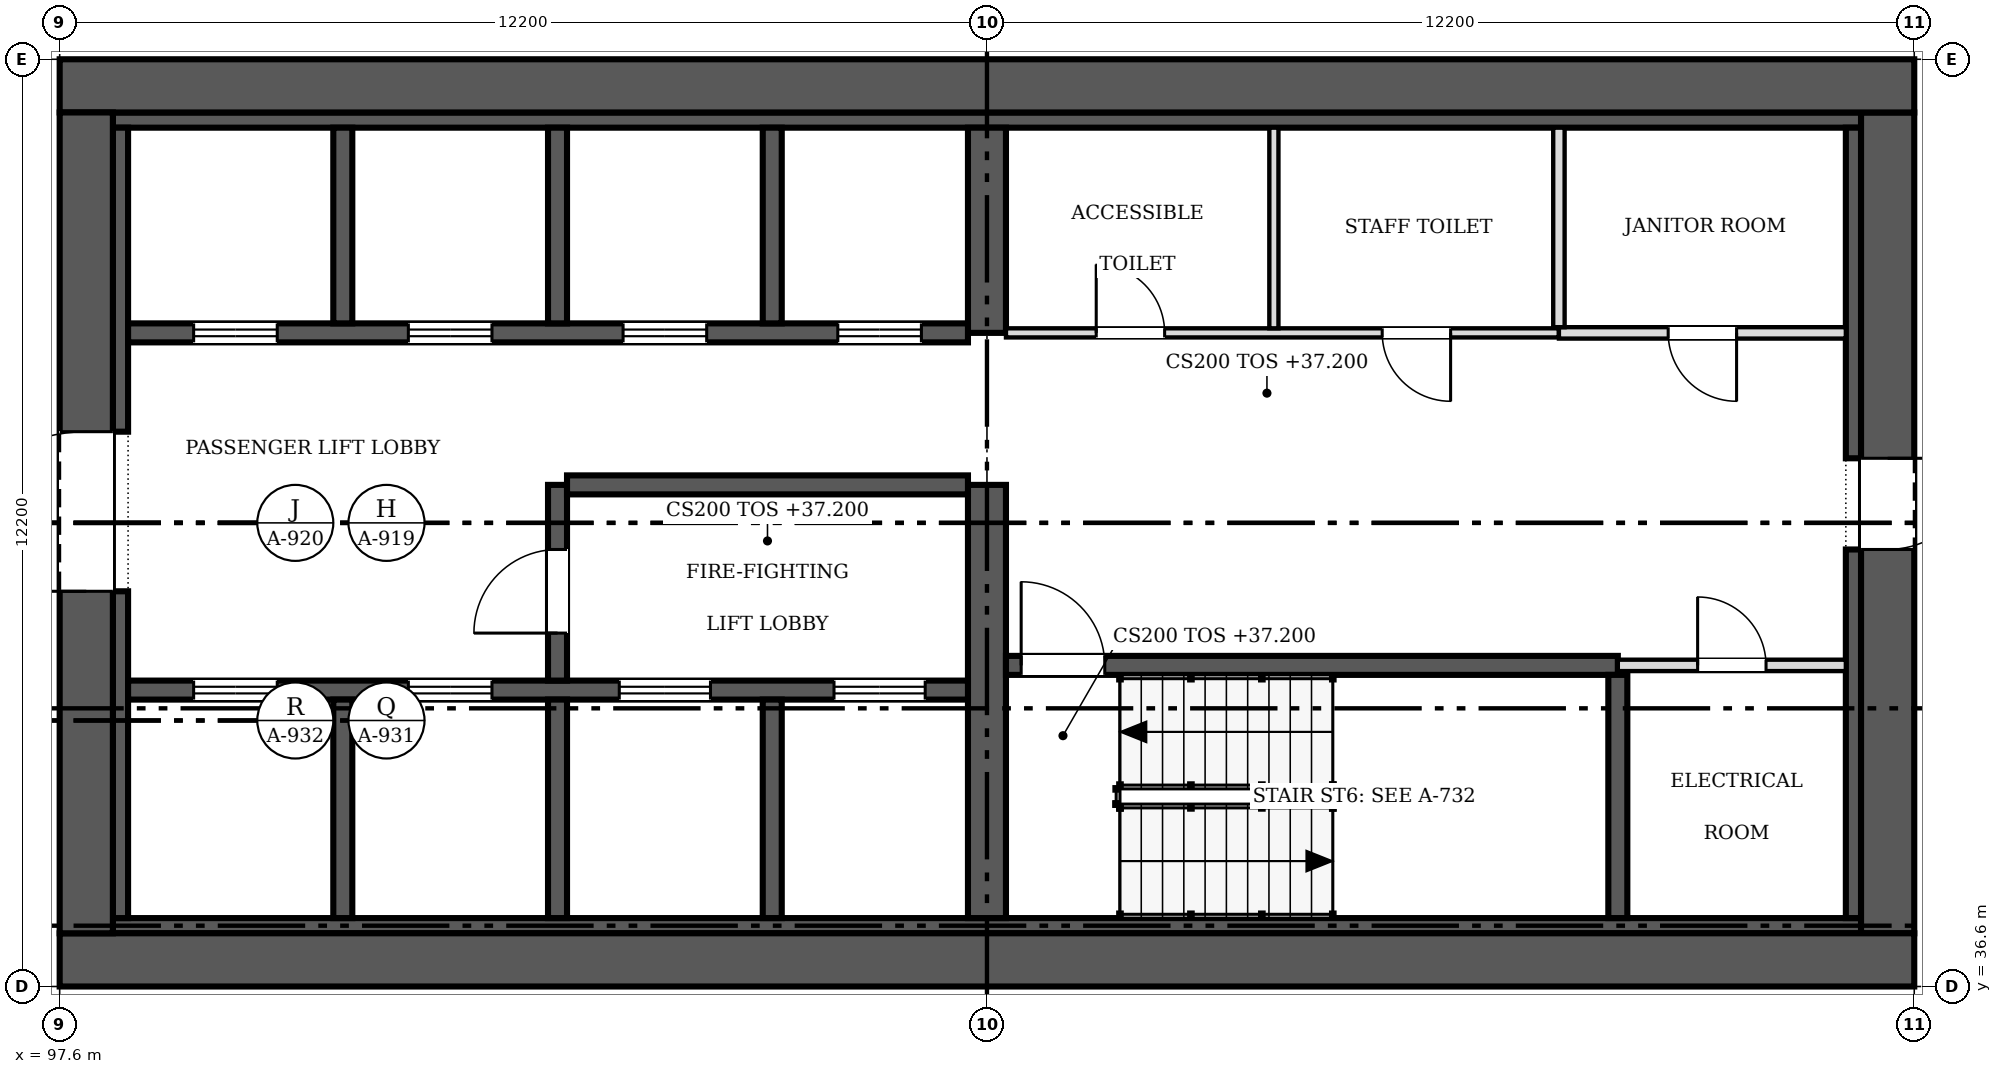
"""IFC4 building model, lengths in metres.
Left out: names, types, materials, properties, quantities, classifications, styles, units other than length and angle.
Written with IfcOpenShell. Run it as: python <this file> out.ifc"""

import sys

from ifc_helpers import new_model, si_unit, direction, frame, frame_2d, origin, place, context, subcontext, project, spatial, rectangle, extrude, source, transform, mapped, element, fill, save


model = new_model("IFC4")
c1 = context("Model", 3, precision=1e-05, world=origin(), true_north=direction((0.0, 1.0)))
c2 = subcontext(c1, "Body", "Model", "MODEL_VIEW")
j1 = project(units=[si_unit("LENGTHUNIT", "METRE"), si_unit("PLANEANGLEUNIT", "RADIAN")], contexts=[c1])
p1 = place(None, origin())
s1 = spatial("IfcSite", under=j1, at=p1, CompositionType="ELEMENT")
p2 = place(p1, origin())
s2 = spatial("IfcBuilding", under=s1, at=p2, CompositionType="ELEMENT")
p3 = place(p2, frame((0.0, 0.0, 37.2)))
s3 = spatial("IfcBuildingStorey", under=s2, at=p3, CompositionType="ELEMENT", Elevation=37.2)
p4 = place(p3, frame((122.0, 36.95, 0.0), z_axis=(0.0, 0.0, 1.0), x_axis=(-1.0, 0.0, 0.0)))
e1 = element("IfcWall", 1, at=p4, inside=s3, PredefinedType="SHEAR", context=c2, shape_type="SweptSolid", body=[
    extrude(rectangle(XDim=24.4, YDim=0.7, at=frame_2d((12.2, 0.0))), origin(), (0.0, 0.0, 1.0), 3.8),
])
p5 = place(p3, frame((97.95, 37.3, 0.0), z_axis=(0.0, 0.0, 1.0), x_axis=(0.0, 1.0, 0.0)))
e2 = element("IfcWall", 2, at=p5, inside=s3, PredefinedType="SHEAR", context=c2, shape_type="SweptSolid", body=[
    extrude(rectangle(XDim=10.8, YDim=0.7, at=frame_2d((5.4, 0.0))), origin(), (0.0, 0.0, 1.0), 3.8),
])
m1 = source(origin(), c2, "Body", "SweptSolid", [
    extrude(rectangle(XDim=2.1, YDim=2.4, at=frame_2d((1.05, 1.2))), frame((0.0, 0.36, 0.0), z_axis=(0.0, -1.0, 0.0), x_axis=(1.0, 0.0, 0.0)), (0.0, 0.0, 1.0), 0.72),
])
p6 = place(p5, frame((4.5, 0.0, 0.0)))
e3 = element("IfcOpeningElement", 3, at=p6, cuts=e2, PredefinedType="OPENING", context=c2, shape_type="MappedRepresentation", body=[
    mapped(m1, transform((0.0, 0.0, 0.0), scale=1.0)),
])
p7 = place(p3, frame((97.6, 48.45, 0.0), z_axis=(0.0, 0.0, 1.0), x_axis=(1.0, 0.0, 0.0)))
e4 = element("IfcWall", 4, at=p7, inside=s3, PredefinedType="SHEAR", context=c2, shape_type="SweptSolid", body=[
    extrude(rectangle(XDim=24.4, YDim=0.7, at=frame_2d((12.2, 0.0))), origin(), (0.0, 0.0, 1.0), 3.8),
])
p8 = place(p3, frame((121.65, 48.1, 0.0), z_axis=(0.0, 0.0, 1.0), x_axis=(0.0, -1.0, 0.0)))
e5 = element("IfcWall", 5, at=p8, inside=s3, PredefinedType="SHEAR", context=c2, shape_type="SweptSolid", body=[
    extrude(rectangle(XDim=10.8, YDim=0.7, at=frame_2d((5.4, 0.0))), origin(), (0.0, 0.0, 1.0), 3.8),
])
m2 = source(origin(), c2, "Body", "SweptSolid", [
    extrude(rectangle(XDim=1.2, YDim=2.1, at=frame_2d((0.6, 1.05))), frame((0.0, 0.36, 0.0), z_axis=(0.0, -1.0, 0.0), x_axis=(1.0, 0.0, 0.0)), (0.0, 0.0, 1.0), 0.72),
])
p9 = place(p8, frame((4.55, 0.0, 0.0)))
e6 = element("IfcOpeningElement", 6, at=p9, cuts=e5, PredefinedType="OPENING", context=c2, shape_type="MappedRepresentation", body=[
    mapped(m2, transform((0.0, 0.0, 0.0), scale=1.0)),
])
for number, where, z_axis, x_axis in (
    (7, (98.3, 37.4, 0.0), (0.0, 0.0, 1.0), (1.0, 0.0, 0.0)),
    (8, (98.3, 48.0, 0.0), (0.0, 0.0, 1.0), (1.0, 0.0, 0.0)),
):
    element("IfcWall", number, at=place(p3, frame(where, z_axis=z_axis, x_axis=x_axis)), inside=s3, PredefinedType="SOLIDWALL", context=c2, shape_type="SweptSolid", body=[
        extrude(rectangle(XDim=23.0, YDim=0.2, at=frame_2d((11.5, 0.0))), origin(), (0.0, 0.0, 1.0), 3.8),
    ])
p10 = place(p3, frame((98.4, 37.5, 0.0), z_axis=(0.0, 0.0, 1.0), x_axis=(0.0, 1.0, 0.0)))
e9 = element("IfcWall", 9, at=p10, inside=s3, PredefinedType="SOLIDWALL", context=c2, shape_type="SweptSolid", body=[
    extrude(rectangle(XDim=4.3, YDim=0.2, at=frame_2d((2.15, 0.0))), origin(), (0.0, 0.0, 1.0), 3.8),
])
p11 = place(p3, frame((98.4, 43.9, 0.0), z_axis=(0.0, 0.0, 1.0), x_axis=(0.0, 1.0, 0.0)))
e10 = element("IfcWall", 10, at=p11, inside=s3, PredefinedType="SOLIDWALL", context=c2, shape_type="SweptSolid", body=[
    extrude(rectangle(XDim=4.0, YDim=0.2, at=frame_2d((2.0, 0.0))), origin(), (0.0, 0.0, 1.0), 3.8),
])
p12 = place(p3, frame((121.2, 37.5, 0.0), z_axis=(0.0, 0.0, 1.0), x_axis=(0.0, 1.0, 0.0)))
e11 = element("IfcWall", 11, at=p12, inside=s3, PredefinedType="SOLIDWALL", context=c2, shape_type="SweptSolid", body=[
    extrude(rectangle(XDim=4.85, YDim=0.2, at=frame_2d((2.425, 0.0))), origin(), (0.0, 0.0, 1.0), 3.8),
])
p13 = place(p3, frame((121.2, 43.55, 0.0), z_axis=(0.0, 0.0, 1.0), x_axis=(0.0, 1.0, 0.0)))
e12 = element("IfcWall", 12, at=p13, inside=s3, PredefinedType="SOLIDWALL", context=c2, shape_type="SweptSolid", body=[
    extrude(rectangle(XDim=4.35, YDim=0.2, at=frame_2d((2.175, 0.0))), origin(), (0.0, 0.0, 1.0), 3.8),
])
p14 = place(p3, frame((109.8, 37.5, 0.0), z_axis=(0.0, 0.0, 1.0), x_axis=(0.0, 1.0, 0.0)))
e13 = element("IfcWall", 13, at=p14, inside=s3, PredefinedType="SHEAR", context=c2, shape_type="SweptSolid", body=[
    extrude(rectangle(XDim=5.7, YDim=0.5, at=frame_2d((2.85, 0.0))), origin(), (0.0, 0.0, 1.0), 3.8),
])
p15 = place(p3, frame((109.8, 45.2, 0.0), z_axis=(0.0, 0.0, 1.0), x_axis=(0.0, 1.0, 0.0)))
e14 = element("IfcWall", 14, at=p15, inside=s3, PredefinedType="SHEAR", context=c2, shape_type="SweptSolid", body=[
    extrude(rectangle(XDim=2.7, YDim=0.5, at=frame_2d((1.35, 0.0))), origin(), (0.0, 0.0, 1.0), 3.8),
])
p16 = place(p3, frame((98.5, 40.5, 0.0), z_axis=(0.0, 0.0, 1.0), x_axis=(1.0, 0.0, 0.0)))
e15 = element("IfcWall", 15, at=p16, inside=s3, PredefinedType="SOLIDWALL", context=c2, shape_type="SweptSolid", body=[
    extrude(rectangle(XDim=11.05, YDim=0.25, at=frame_2d((5.525, 0.0))), origin(), (0.0, 0.0, 1.0), 3.8),
])
m3 = source(origin(), c2, "Body", "SweptSolid", [
    extrude(rectangle(XDim=1.1, YDim=2.1, at=frame_2d((0.55, 1.05))), frame((0.0, 0.135, 0.0), z_axis=(0.0, -1.0, 0.0), x_axis=(1.0, 0.0, 0.0)), (0.0, 0.0, 1.0), 0.27),
])
p17 = place(p16, frame((0.863, 0.0, 0.0)))
e16 = element("IfcOpeningElement", 16, at=p17, cuts=e15, PredefinedType="OPENING", context=c2, shape_type="MappedRepresentation", body=[
    mapped(m3, transform((0.0, 0.0, 0.0), scale=1.0)),
])
p18 = place(p16, frame((3.688, 0.0, 0.0)))
e17 = element("IfcOpeningElement", 17, at=p18, cuts=e15, PredefinedType="OPENING", context=c2, shape_type="MappedRepresentation", body=[
    mapped(m3, transform((0.0, 0.0, 0.0), scale=1.0)),
])
m4 = source(origin(), c2, "Body", "SweptSolid", [
    extrude(rectangle(XDim=1.2, YDim=2.1, at=frame_2d((0.6, 1.05))), frame((0.0, 0.135, 0.0), z_axis=(0.0, -1.0, 0.0), x_axis=(1.0, 0.0, 0.0)), (0.0, 0.0, 1.0), 0.27),
])
p19 = place(p16, frame((6.462, 0.0, 0.0)))
e18 = element("IfcOpeningElement", 18, at=p19, cuts=e15, PredefinedType="OPENING", context=c2, shape_type="MappedRepresentation", body=[
    mapped(m4, transform((0.0, 0.0, 0.0), scale=1.0)),
])
p20 = place(p16, frame((9.288, 0.0, 0.0)))
e19 = element("IfcOpeningElement", 19, at=p20, cuts=e15, PredefinedType="OPENING", context=c2, shape_type="MappedRepresentation", body=[
    mapped(m4, transform((0.0, 0.0, 0.0), scale=1.0)),
])
p21 = place(p3, frame((109.55, 45.2, 0.0), z_axis=(0.0, 0.0, 1.0), x_axis=(-1.0, 0.0, 0.0)))
e20 = element("IfcWall", 20, at=p21, inside=s3, PredefinedType="SOLIDWALL", context=c2, shape_type="SweptSolid", body=[
    extrude(rectangle(XDim=11.05, YDim=0.25, at=frame_2d((5.525, 0.0))), origin(), (0.0, 0.0, 1.0), 3.8),
])
p22 = place(p21, frame((9.087, 0.0, 0.0)))
e21 = element("IfcOpeningElement", 21, at=p22, cuts=e20, PredefinedType="OPENING", context=c2, shape_type="MappedRepresentation", body=[
    mapped(m3, transform((0.0, 0.0, 0.0), scale=1.0)),
])
p23 = place(p21, frame((6.262, 0.0, 0.0)))
e22 = element("IfcOpeningElement", 22, at=p23, cuts=e20, PredefinedType="OPENING", context=c2, shape_type="MappedRepresentation", body=[
    mapped(m3, transform((0.0, 0.0, 0.0), scale=1.0)),
])
p24 = place(p21, frame((3.438, 0.0, 0.0)))
e23 = element("IfcOpeningElement", 23, at=p24, cuts=e20, PredefinedType="OPENING", context=c2, shape_type="MappedRepresentation", body=[
    mapped(m3, transform((0.0, 0.0, 0.0), scale=1.0)),
])
p25 = place(p21, frame((0.613, 0.0, 0.0)))
e24 = element("IfcOpeningElement", 24, at=p25, cuts=e20, PredefinedType="OPENING", context=c2, shape_type="MappedRepresentation", body=[
    mapped(m3, transform((0.0, 0.0, 0.0), scale=1.0)),
])
p26 = place(p3, frame((118.1, 40.825, 0.0), z_axis=(0.0, 0.0, 1.0), x_axis=(-1.0, 0.0, 0.0)))
e25 = element("IfcWall", 25, at=p26, inside=s3, PredefinedType="SOLIDWALL", context=c2, shape_type="SweptSolid", body=[
    extrude(rectangle(XDim=8.05, YDim=0.25, at=frame_2d((4.025, 0.0))), origin(), (0.0, 0.0, 1.0), 3.8),
])
p27 = place(p26, frame((6.75, 0.0, 0.0)))
e26 = element("IfcOpeningElement", 26, at=p27, cuts=e25, PredefinedType="OPENING", context=c2, shape_type="MappedRepresentation", body=[
    mapped(m3, transform((0.0, 0.0, 0.0), scale=1.0)),
])
p28 = place(p3, frame((104.15, 37.5, 0.0), z_axis=(0.0, 0.0, 1.0), x_axis=(0.0, 1.0, 0.0)))
e27 = element("IfcWall", 27, at=p28, inside=s3, PredefinedType="SOLIDWALL", context=c2, shape_type="SweptSolid", body=[
    extrude(rectangle(XDim=2.875, YDim=0.25, at=frame_2d((1.438, 0.0))), origin(), (0.0, 0.0, 1.0), 3.8),
])
p29 = place(p3, frame((104.15, 43.2, 0.0), z_axis=(0.0, 0.0, 1.0), x_axis=(0.0, -1.0, 0.0)))
e28 = element("IfcWall", 28, at=p29, inside=s3, PredefinedType="SOLIDWALL", context=c2, shape_type="SweptSolid", body=[
    extrude(rectangle(XDim=2.575, YDim=0.25, at=frame_2d((1.288, 0.0))), origin(), (0.0, 0.0, 1.0), 3.8),
])
p30 = place(p29, frame((0.85, 0.0, 0.0)))
e29 = element("IfcOpeningElement", 29, at=p30, cuts=e28, PredefinedType="OPENING", context=c2, shape_type="MappedRepresentation", body=[
    mapped(m3, transform((0.0, 0.0, 0.0), scale=1.0)),
])
p31 = place(p3, frame((104.275, 43.2, 0.0), z_axis=(0.0, 0.0, 1.0), x_axis=(1.0, 0.0, 0.0)))
e30 = element("IfcWall", 30, at=p31, inside=s3, PredefinedType="SOLIDWALL", context=c2, shape_type="SweptSolid", body=[
    extrude(rectangle(XDim=5.275, YDim=0.25, at=frame_2d((2.638, 0.0))), origin(), (0.0, 0.0, 1.0), 3.8),
])
p32 = place(p3, frame((118.1, 37.5, 0.0), z_axis=(0.0, 0.0, 1.0), x_axis=(0.0, 1.0, 0.0)))
e31 = element("IfcWall", 31, at=p32, inside=s3, PredefinedType="SOLIDWALL", context=c2, shape_type="SweptSolid", body=[
    extrude(rectangle(XDim=3.2, YDim=0.25, at=frame_2d((1.6, 0.0))), origin(), (0.0, 0.0, 1.0), 3.8),
])
for number, where, z_axis, x_axis in (
    (32, (101.325, 37.5, 0.0), (0.0, 0.0, 1.0), (0.0, 1.0, 0.0)),
    (33, (106.975, 37.5, 0.0), (0.0, 0.0, 1.0), (0.0, 1.0, 0.0)),
):
    element("IfcWall", number, at=place(p3, frame(where, z_axis=z_axis, x_axis=x_axis)), inside=s3, PredefinedType="SOLIDWALL", context=c2, shape_type="SweptSolid", body=[
        extrude(rectangle(XDim=2.875, YDim=0.25, at=frame_2d((1.438, 0.0))), origin(), (0.0, 0.0, 1.0), 3.8),
    ])
for number, where, z_axis, x_axis in (
    (34, (101.325, 45.325, 0.0), (0.0, 0.0, 1.0), (0.0, 1.0, 0.0)),
    (35, (104.15, 45.325, 0.0), (0.0, 0.0, 1.0), (0.0, 1.0, 0.0)),
    (36, (106.975, 45.325, 0.0), (0.0, 0.0, 1.0), (0.0, 1.0, 0.0)),
):
    element("IfcWall", number, at=place(p3, frame(where, z_axis=z_axis, x_axis=x_axis)), inside=s3, PredefinedType="SOLIDWALL", context=c2, shape_type="SweptSolid", body=[
        extrude(rectangle(XDim=2.575, YDim=0.25, at=frame_2d((1.288, 0.0))), origin(), (0.0, 0.0, 1.0), 3.8),
    ])
p33 = place(p3, frame((110.05, 45.2, 0.0), z_axis=(0.0, 0.0, 1.0), x_axis=(1.0, 0.0, 0.0)))
e37 = element("IfcWall", 37, at=p33, inside=s3, PredefinedType="PARTITIONING", context=c2, shape_type="SweptSolid", body=[
    extrude(rectangle(XDim=7.275, YDim=0.12, at=frame_2d((3.637, 0.0))), origin(), (0.0, 0.0, 1.0), 3.6),
])
m5 = source(origin(), c2, "Body", "SweptSolid", [
    extrude(rectangle(XDim=0.9, YDim=2.1, at=frame_2d((0.45, 1.05))), frame((0.0, 0.07, 0.0), z_axis=(0.0, -1.0, 0.0), x_axis=(1.0, 0.0, 0.0)), (0.0, 0.0, 1.0), 0.14),
])
p34 = place(p33, frame((1.188, 0.0, 0.0)))
e38 = element("IfcOpeningElement", 38, at=p34, cuts=e37, PredefinedType="OPENING", context=c2, shape_type="MappedRepresentation", body=[
    mapped(m5, transform((0.0, 0.0, 0.0), scale=1.0)),
])
p35 = place(p33, frame((4.95, 0.0, 0.0)))
e39 = element("IfcOpeningElement", 39, at=p35, cuts=e37, PredefinedType="OPENING", context=c2, shape_type="MappedRepresentation", body=[
    mapped(m5, transform((0.0, 0.0, 0.0), scale=1.0)),
])
p36 = place(p3, frame((117.325, 45.2, 0.0), z_axis=(0.0, 0.0, 1.0), x_axis=(1.0, 0.0, 0.0)))
e40 = element("IfcWall", 40, at=p36, inside=s3, PredefinedType="PARTITIONING", context=c2, shape_type="SweptSolid", body=[
    extrude(rectangle(XDim=3.775, YDim=0.15, at=frame_2d((1.888, 0.0))), origin(), (0.0, 0.0, 1.0), 3.6),
])
m6 = source(origin(), c2, "Body", "SweptSolid", [
    extrude(rectangle(XDim=0.9, YDim=2.1, at=frame_2d((0.45, 1.05))), frame((0.0, 0.085, 0.0), z_axis=(0.0, -1.0, 0.0), x_axis=(1.0, 0.0, 0.0)), (0.0, 0.0, 1.0), 0.17),
])
p37 = place(p36, frame((1.438, 0.0, 0.0)))
e41 = element("IfcOpeningElement", 41, at=p37, cuts=e40, PredefinedType="OPENING", context=c2, shape_type="MappedRepresentation", body=[
    mapped(m6, transform((0.0, 0.0, 0.0), scale=1.0)),
])
p38 = place(p3, frame((121.1, 40.825, 0.0), z_axis=(0.0, 0.0, 1.0), x_axis=(-1.0, 0.0, 0.0)))
e42 = element("IfcWall", 42, at=p38, inside=s3, PredefinedType="PARTITIONING", context=c2, shape_type="SweptSolid", body=[
    extrude(rectangle(XDim=3.0, YDim=0.15, at=frame_2d((1.5, 0.0))), origin(), (0.0, 0.0, 1.0), 3.6),
])
p39 = place(p38, frame((1.05, 0.0, 0.0)))
e43 = element("IfcOpeningElement", 43, at=p39, cuts=e42, PredefinedType="OPENING", context=c2, shape_type="MappedRepresentation", body=[
    mapped(m6, transform((0.0, 0.0, 0.0), scale=1.0)),
])
p40 = place(p3, frame((113.575, 45.26, 0.0), z_axis=(0.0, 0.0, 1.0), x_axis=(0.0, 1.0, 0.0)))
e44 = element("IfcWall", 44, at=p40, inside=s3, PredefinedType="PARTITIONING", context=c2, shape_type="SweptSolid", body=[
    extrude(rectangle(XDim=2.64, YDim=0.12, at=frame_2d((1.32, 0.0))), origin(), (0.0, 0.0, 1.0), 3.6),
])
p41 = place(p3, frame((117.325, 45.275, 0.0), z_axis=(0.0, 0.0, 1.0), x_axis=(0.0, 1.0, 0.0)))
e45 = element("IfcWall", 45, at=p41, inside=s3, PredefinedType="PARTITIONING", context=c2, shape_type="SweptSolid", body=[
    extrude(rectangle(XDim=2.625, YDim=0.15, at=frame_2d((1.312, 0.0))), origin(), (0.0, 0.0, 1.0), 3.6),
])
m7 = source(origin(), c2, "Body", "SweptSolid", [
    extrude(rectangle(XDim=2.1, YDim=2.4, at=frame_2d((1.05, 1.2))), frame((0.0, 0.025, 0.0), z_axis=(0.0, -1.0, 0.0), x_axis=(1.0, 0.0, 0.0)), (0.0, 0.0, 1.0), 0.05),
])
p42 = place(p6, origin())
e46 = element("IfcDoor", 46, at=p42, inside=s3, OperationType="DOUBLE_DOOR_SINGLE_SWING", PredefinedType="DOOR", context=c2, shape_type="MappedRepresentation", body=[
    mapped(m7, transform((0.0, 0.0, 0.0), scale=1.0)),
])
fill(e3, e46)
m8 = source(origin(), c2, "Body", "SweptSolid", [
    extrude(rectangle(XDim=1.2, YDim=2.1, at=frame_2d((0.6, 1.05))), frame((0.0, 0.025, 0.0), z_axis=(0.0, -1.0, 0.0), x_axis=(1.0, 0.0, 0.0)), (0.0, 0.0, 1.0), 0.05),
])
p43 = place(p9, origin())
e47 = element("IfcDoor", 47, at=p43, inside=s3, OperationType="SINGLE_SWING_LEFT", PredefinedType="DOOR", context=c2, shape_type="MappedRepresentation", body=[
    mapped(m8, transform((0.0, 0.0, 0.0), scale=1.0)),
])
fill(e6, e47)
m9 = source(origin(), c2, "Body", "SweptSolid", [
    extrude(rectangle(XDim=1.1, YDim=2.1, at=frame_2d((0.55, 1.05))), frame((0.0, 0.025, 0.0), z_axis=(0.0, -1.0, 0.0), x_axis=(1.0, 0.0, 0.0)), (0.0, 0.0, 1.0), 0.05),
])
p44 = place(p17, origin())
e48 = element("IfcDoor", 48, at=p44, inside=s3, OperationType="DOUBLE_DOOR_SLIDING", PredefinedType="DOOR", context=c2, shape_type="MappedRepresentation", body=[
    mapped(m9, transform((0.0, 0.0, 0.0), scale=1.0)),
])
fill(e16, e48)
p45 = place(p18, origin())
e49 = element("IfcDoor", 49, at=p45, inside=s3, OperationType="DOUBLE_DOOR_SLIDING", PredefinedType="DOOR", context=c2, shape_type="MappedRepresentation", body=[
    mapped(m9, transform((0.0, 0.0, 0.0), scale=1.0)),
])
fill(e17, e49)
p46 = place(p19, origin())
e50 = element("IfcDoor", 50, at=p46, inside=s3, OperationType="DOUBLE_DOOR_SLIDING", PredefinedType="DOOR", context=c2, shape_type="MappedRepresentation", body=[
    mapped(m8, transform((0.0, 0.0, 0.0), scale=1.0)),
])
fill(e18, e50)
p47 = place(p20, origin())
e51 = element("IfcDoor", 51, at=p47, inside=s3, OperationType="DOUBLE_DOOR_SLIDING", PredefinedType="DOOR", context=c2, shape_type="MappedRepresentation", body=[
    mapped(m8, transform((0.0, 0.0, 0.0), scale=1.0)),
])
fill(e19, e51)
p48 = place(p22, origin())
e52 = element("IfcDoor", 52, at=p48, inside=s3, OperationType="DOUBLE_DOOR_SLIDING", PredefinedType="DOOR", context=c2, shape_type="MappedRepresentation", body=[
    mapped(m9, transform((0.0, 0.0, 0.0), scale=1.0)),
])
fill(e21, e52)
p49 = place(p23, origin())
e53 = element("IfcDoor", 53, at=p49, inside=s3, OperationType="DOUBLE_DOOR_SLIDING", PredefinedType="DOOR", context=c2, shape_type="MappedRepresentation", body=[
    mapped(m9, transform((0.0, 0.0, 0.0), scale=1.0)),
])
fill(e22, e53)
p50 = place(p24, origin())
e54 = element("IfcDoor", 54, at=p50, inside=s3, OperationType="DOUBLE_DOOR_SLIDING", PredefinedType="DOOR", context=c2, shape_type="MappedRepresentation", body=[
    mapped(m9, transform((0.0, 0.0, 0.0), scale=1.0)),
])
fill(e23, e54)
p51 = place(p25, origin())
e55 = element("IfcDoor", 55, at=p51, inside=s3, OperationType="DOUBLE_DOOR_SLIDING", PredefinedType="DOOR", context=c2, shape_type="MappedRepresentation", body=[
    mapped(m9, transform((0.0, 0.0, 0.0), scale=1.0)),
])
fill(e24, e55)
p52 = place(p27, origin())
e56 = element("IfcDoor", 56, at=p52, inside=s3, OperationType="SINGLE_SWING_RIGHT", PredefinedType="DOOR", context=c2, shape_type="MappedRepresentation", body=[
    mapped(m9, transform((0.0, 0.0, 0.0), scale=1.0)),
])
fill(e26, e56)
p53 = place(p30, origin())
e57 = element("IfcDoor", 57, at=p53, inside=s3, OperationType="SINGLE_SWING_RIGHT", PredefinedType="DOOR", context=c2, shape_type="MappedRepresentation", body=[
    mapped(m9, transform((0.0, 0.0, 0.0), scale=1.0)),
])
fill(e29, e57)
m10 = source(origin(), c2, "Body", "SweptSolid", [
    extrude(rectangle(XDim=0.9, YDim=2.1, at=frame_2d((0.45, 1.05))), frame((0.0, 0.025, 0.0), z_axis=(0.0, -1.0, 0.0), x_axis=(1.0, 0.0, 0.0)), (0.0, 0.0, 1.0), 0.05),
])
p54 = place(p34, origin())
e58 = element("IfcDoor", 58, at=p54, inside=s3, OperationType="SINGLE_SWING_LEFT", PredefinedType="DOOR", context=c2, shape_type="MappedRepresentation", body=[
    mapped(m10, transform((0.0, 0.0, 0.0), scale=1.0)),
])
fill(e38, e58)
p55 = place(p35, origin())
e59 = element("IfcDoor", 59, at=p55, inside=s3, OperationType="SINGLE_SWING_RIGHT", PredefinedType="DOOR", context=c2, shape_type="MappedRepresentation", body=[
    mapped(m10, transform((0.0, 0.0, 0.0), scale=1.0)),
])
fill(e39, e59)
p56 = place(p37, origin())
e60 = element("IfcDoor", 60, at=p56, inside=s3, OperationType="SINGLE_SWING_RIGHT", PredefinedType="DOOR", context=c2, shape_type="MappedRepresentation", body=[
    mapped(m10, transform((0.0, 0.0, 0.0), scale=1.0)),
])
fill(e41, e60)
p57 = place(p39, origin())
e61 = element("IfcDoor", 61, at=p57, inside=s3, OperationType="SINGLE_SWING_RIGHT", PredefinedType="DOOR", context=c2, shape_type="MappedRepresentation", body=[
    mapped(m10, transform((0.0, 0.0, 0.0), scale=1.0)),
])
fill(e43, e61)
save(model, sys.argv[1])
